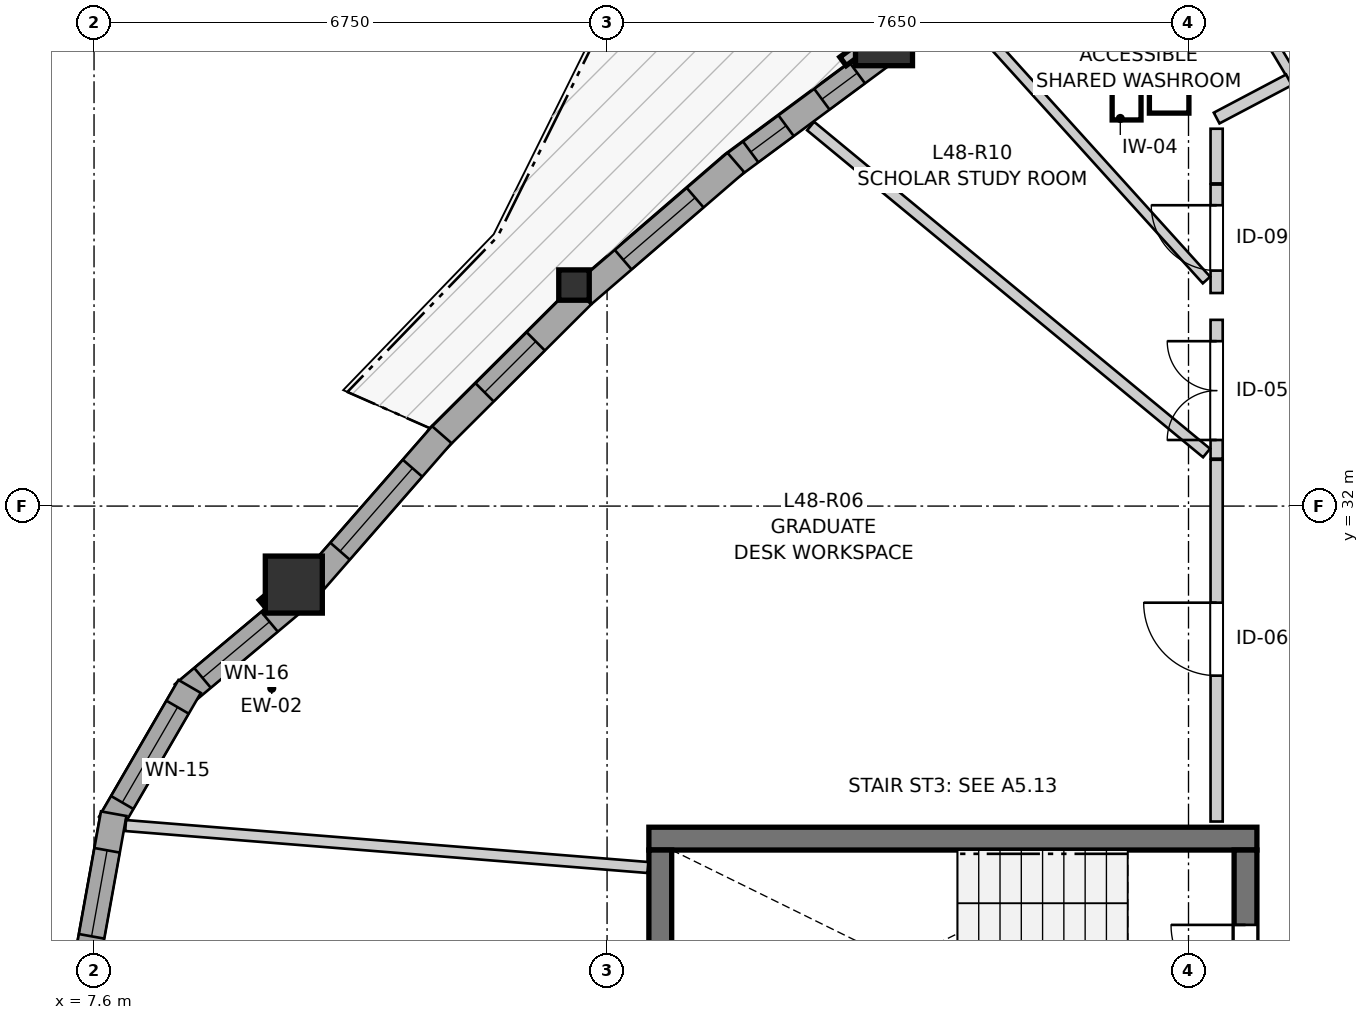
"""IFC4 building model, lengths in metres.
Left out: names, types, materials, properties, quantities, classifications, styles, units other than length and angle.
Written with IfcOpenShell. Run it as: python <this file> out.ifc"""

import sys

from ifc_helpers import new_model, si_unit, direction, frame, frame_2d, origin, origin_2d, place, context, subcontext, project, spatial, rectangle, i_section, extrude, source, transform, mapped, element, fill, save


model = new_model("IFC4")
c1 = context("Model", 3, precision=1e-05, world=origin(), true_north=direction((0.0, 1.0)))
c2 = subcontext(c1, "Body", "Model", "MODEL_VIEW")
j1 = project(units=[si_unit("LENGTHUNIT", "METRE"), si_unit("PLANEANGLEUNIT", "RADIAN")], contexts=[c1])
p1 = place(None, origin())
s1 = spatial("IfcSite", under=j1, at=p1, CompositionType="ELEMENT")
p2 = place(p1, origin())
s2 = spatial("IfcBuilding", under=s1, at=p2, CompositionType="ELEMENT")
p3 = place(p2, frame((0.0, 0.0, 161.8)))
s3 = spatial("IfcBuildingStorey", under=s2, at=p3, CompositionType="ELEMENT", Elevation=161.8)
p4 = place(p3, frame((22.9, 27.625, 0.0), z_axis=(0.0, 0.0, 1.0), x_axis=(-1.0, 0.0, 0.0)))
e1 = element("IfcWall", 1, at=p4, inside=s3, PredefinedType="SHEAR", context=c2, shape_type="SweptSolid", body=[
    extrude(rectangle(XDim=8.0, YDim=0.3, at=frame_2d((4.0, 0.0))), origin(), (0.0, 0.0, 1.0), 2.95),
])
p5 = place(p3, frame((15.05, 27.475, 0.0), z_axis=(0.0, 0.0, 1.0), x_axis=(0.0, -1.0, 0.0)))
e2 = element("IfcWall", 2, at=p5, inside=s3, PredefinedType="SHEAR", context=c2, shape_type="SweptSolid", body=[
    extrude(rectangle(XDim=2.95, YDim=0.3, at=frame_2d((1.475, 0.0))), origin(), (0.0, 0.0, 1.0), 2.95),
])
p6 = place(p3, frame((22.75, 24.525, 0.0), z_axis=(0.0, 0.0, 1.0), x_axis=(0.0, 1.0, 0.0)))
e3 = element("IfcWall", 3, at=p6, inside=s3, PredefinedType="SHEAR", context=c2, shape_type="SweptSolid", body=[
    extrude(rectangle(XDim=2.95, YDim=0.3, at=frame_2d((1.475, 0.0))), origin(), (0.0, 0.0, 1.0), 2.95),
])
p7 = place(p6, frame((0.985, 0.0, 0.0)))
e4 = element("IfcOpeningElement", 4, at=p7, cuts=e3, PredefinedType="OPENING", context=c2, shape_type="SweptSolid", body=[
    extrude(rectangle(XDim=0.98, YDim=2.15, at=frame_2d((0.49, 1.075))), frame((0.0, 0.16, 0.0), z_axis=(0.0, -1.0, 0.0), x_axis=(1.0, 0.0, 0.0)), (0.0, 0.0, 1.0), 0.32),
])
m1 = source(origin(), c2, "Body", "SweptSolid", [
    extrude(rectangle(XDim=0.75, YDim=0.75, at=origin_2d()), origin(), (0.0, 0.0, 1.0), 2.95),
])
for number, where, z_axis, x_axis in (
    (5, (10.229, 30.967, 0.0), (0.0, 0.0, 1.0), (1.0, 0.0, 0.0)),
    (6, (17.994, 38.169, 0.0), (0.0, 0.0, 1.0), (1.0, 0.0, 0.0)),
):
    element("IfcColumn", number, at=place(p3, frame(where, z_axis=z_axis, x_axis=x_axis)), inside=s3, PredefinedType="COLUMN", context=c2, shape_type="MappedRepresentation", body=[
        mapped(m1, transform((0.0, 0.0, 0.0), x_axis=(1.0, 0.0, 0.0), y_axis=(0.0, 1.0, 0.0), z_axis=(0.0, 0.0, 1.0), scale=1.0)),
    ])
m2 = source(origin(), c2, "Body", "SweptSolid", [
    extrude(i_section(OverallWidth=0.401, OverallDepth=0.399, WebThickness=0.023, FlangeThickness=0.036, FilletRadius=0.015, at=origin_2d()), origin(), (0.0, 0.0, 1.0), 2.95),
])
p8 = place(p3, frame((13.915, 34.908, 0.0), z_axis=(0.0, 0.0, 1.0), x_axis=(1.0, 0.0, 0.0)))
e7 = element("IfcColumn", 7, at=p8, inside=s3, PredefinedType="PILASTER", context=c2, shape_type="MappedRepresentation", body=[
    mapped(m2, transform((0.0, 0.0, 0.0), x_axis=(1.0, 0.0, 0.0), y_axis=(0.0, 1.0, 0.0), z_axis=(0.0, 0.0, 1.0), scale=1.0)),
])
p9 = place(p3, frame((10.219, 30.737, 0.0), z_axis=(0.0, 0.0, 1.0), x_axis=(-0.76661852922, -0.642102819381, 0.0)))
e8 = element("IfcWall", 8, at=p9, inside=s3, PredefinedType="SOLIDWALL", context=c2, shape_type="SweptSolid", body=[
    extrude(rectangle(XDim=1.888, YDim=0.34, at=frame_2d((0.944, 0.0))), origin(), (0.0, 0.0, 1.0), 2.53),
])
p10 = place(p9, frame((0.404, 0.0, 0.82)))
e9 = element("IfcOpeningElement", 9, at=p10, cuts=e8, PredefinedType="OPENING", context=c2, shape_type="SweptSolid", body=[
    extrude(rectangle(XDim=1.15, YDim=1.2, at=frame_2d((0.575, 0.6))), frame((0.0, 0.18, 0.0), z_axis=(0.0, -1.0, 0.0), x_axis=(1.0, 0.0, 0.0)), (0.0, 0.0, 1.0), 0.36),
])
p11 = place(p3, frame((8.858, 29.627, 0.0), z_axis=(0.0, 0.0, 1.0), x_axis=(-0.502177965272, -0.864764298058, 0.0)))
e10 = element("IfcWall", 10, at=p11, inside=s3, PredefinedType="SOLIDWALL", context=c2, shape_type="SweptSolid", body=[
    extrude(rectangle(XDim=2.081, YDim=0.34, at=frame_2d((1.041, 0.0))), origin(), (0.0, 0.0, 1.0), 2.53),
])
p12 = place(p11, frame((0.315, 0.0, 0.82)))
e11 = element("IfcOpeningElement", 11, at=p12, cuts=e10, PredefinedType="OPENING", context=c2, shape_type="SweptSolid", body=[
    extrude(rectangle(XDim=1.45, YDim=1.25, at=frame_2d((0.725, 0.625))), frame((0.0, 0.18, 0.0), z_axis=(0.0, -1.0, 0.0), x_axis=(1.0, 0.0, 0.0)), (0.0, 0.0, 1.0), 0.36),
])
p13 = place(p3, frame((7.859, 27.953, 0.0), z_axis=(0.0, 0.0, 1.0), x_axis=(-0.177605215389, -0.984101817632, 0.0)))
e12 = element("IfcWall", 12, at=p13, inside=s3, PredefinedType="SOLIDWALL", context=c2, shape_type="SweptSolid", body=[
    extrude(rectangle(XDim=2.081, YDim=0.34, at=frame_2d((1.041, 0.0))), origin(), (0.0, 0.0, 1.0), 2.53),
])
p14 = place(p13, frame((0.489, 0.0, 0.82)))
e13 = element("IfcOpeningElement", 13, at=p14, cuts=e12, PredefinedType="OPENING", context=c2, shape_type="SweptSolid", body=[
    extrude(rectangle(XDim=1.15, YDim=1.2, at=frame_2d((0.575, 0.6))), frame((0.0, 0.18, 0.0), z_axis=(0.0, -1.0, 0.0), x_axis=(1.0, 0.0, 0.0)), (0.0, 0.0, 1.0), 0.36),
])
p15 = place(p3, frame((20.303, 39.421, 0.0), z_axis=(0.0, 0.0, 1.0), x_axis=(-0.846381586821, -0.532576951707, 0.0)))
e14 = element("IfcWall", 14, at=p15, inside=s3, PredefinedType="SOLIDWALL", context=c2, shape_type="SweptSolid", body=[
    extrude(rectangle(XDim=2.466, YDim=0.34, at=frame_2d((1.233, 0.0))), origin(), (0.0, 0.0, 1.0), 2.53),
])
p16 = place(p15, frame((0.287, 0.0, 0.82)))
e15 = element("IfcOpeningElement", 15, at=p16, cuts=e14, PredefinedType="OPENING", context=c2, shape_type="SweptSolid", body=[
    extrude(rectangle(XDim=1.05, YDim=1.45, at=frame_2d((0.525, 0.725))), frame((0.0, 0.18, 0.0), z_axis=(0.0, -1.0, 0.0), x_axis=(1.0, 0.0, 0.0)), (0.0, 0.0, 1.0), 0.36),
])
p17 = place(p3, frame((17.97, 37.94, 0.0), z_axis=(0.0, 0.0, 1.0), x_axis=(-0.803844722302, -0.594839190393, 0.0)))
e16 = element("IfcWall", 16, at=p17, inside=s3, PredefinedType="SOLIDWALL", context=c2, shape_type="SweptSolid", body=[
    extrude(rectangle(XDim=2.481, YDim=0.34, at=frame_2d((1.24, 0.0))), origin(), (0.0, 0.0, 1.0), 2.53),
])
p18 = place(p17, frame((0.407, 0.0, 0.82)))
e17 = element("IfcOpeningElement", 17, at=p18, cuts=e16, PredefinedType="OPENING", context=c2, shape_type="SweptSolid", body=[
    extrude(rectangle(XDim=0.58, YDim=1.35, at=frame_2d((0.29, 0.675))), frame((0.0, 0.18, 0.0), z_axis=(0.0, -1.0, 0.0), x_axis=(1.0, 0.0, 0.0)), (0.0, 0.0, 1.0), 0.36),
])
p19 = place(p17, frame((1.573, 0.0, 0.82)))
e18 = element("IfcOpeningElement", 18, at=p19, cuts=e16, PredefinedType="OPENING", context=c2, shape_type="SweptSolid", body=[
    extrude(rectangle(XDim=0.58, YDim=1.35, at=frame_2d((0.29, 0.675))), frame((0.0, 0.18, 0.0), z_axis=(0.0, -1.0, 0.0), x_axis=(1.0, 0.0, 0.0)), (0.0, 0.0, 1.0), 0.36),
])
p20 = place(p3, frame((16.045, 36.519, 0.0), z_axis=(0.0, 0.0, 1.0), x_axis=(-0.757449302754, -0.652893983551, 0.0)))
e19 = element("IfcWall", 19, at=p20, inside=s3, PredefinedType="SOLIDWALL", context=c2, shape_type="SweptSolid", body=[
    extrude(rectangle(XDim=2.646, YDim=0.34, at=frame_2d((1.323, 0.0))), origin(), (0.0, 0.0, 1.0), 2.53),
])
p21 = place(p20, frame((0.708, 0.0, 0.82)))
e20 = element("IfcOpeningElement", 20, at=p21, cuts=e19, PredefinedType="OPENING", context=c2, shape_type="SweptSolid", body=[
    extrude(rectangle(XDim=1.25, YDim=1.35, at=frame_2d((0.625, 0.675))), frame((0.0, 0.18, 0.0), z_axis=(0.0, -1.0, 0.0), x_axis=(1.0, 0.0, 0.0)), (0.0, 0.0, 1.0), 0.36),
])
p22 = place(p3, frame((14.021, 34.773, 0.0), z_axis=(0.0, 0.0, 1.0), x_axis=(-0.708421987765, -0.705789123784, 0.0)))
e21 = element("IfcWall", 21, at=p22, inside=s3, PredefinedType="SOLIDWALL", context=c2, shape_type="SweptSolid", body=[
    extrude(rectangle(XDim=2.689, YDim=0.34, at=frame_2d((1.345, 0.0))), origin(), (0.0, 0.0, 1.0), 2.53),
])
p23 = place(p22, frame((0.86, 0.0, 0.82)))
e22 = element("IfcOpeningElement", 22, at=p23, cuts=e21, PredefinedType="OPENING", context=c2, shape_type="SweptSolid", body=[
    extrude(rectangle(XDim=0.95, YDim=1.35, at=frame_2d((0.475, 0.675))), frame((0.0, 0.18, 0.0), z_axis=(0.0, -1.0, 0.0), x_axis=(1.0, 0.0, 0.0)), (0.0, 0.0, 1.0), 0.36),
])
p24 = place(p3, frame((12.176, 32.939, 0.0), z_axis=(0.0, 0.0, 1.0), x_axis=(-0.65766354423, -0.753311796397, 0.0)))
e23 = element("IfcWall", 23, at=p24, inside=s3, PredefinedType="SOLIDWALL", context=c2, shape_type="SweptSolid", body=[
    extrude(rectangle(XDim=2.611, YDim=0.34, at=frame_2d((1.306, 0.0))), origin(), (0.0, 0.0, 1.0), 2.53),
])
p25 = place(p24, frame((0.586, 0.0, 0.82)))
e24 = element("IfcOpeningElement", 24, at=p25, cuts=e23, PredefinedType="OPENING", context=c2, shape_type="SweptSolid", body=[
    extrude(rectangle(XDim=1.45, YDim=1.25, at=frame_2d((0.725, 0.625))), frame((0.0, 0.18, 0.0), z_axis=(0.0, -1.0, 0.0), x_axis=(1.0, 0.0, 0.0)), (0.0, 0.0, 1.0), 0.36),
])
p26 = place(p3, frame((22.37, 27.85, 0.0), z_axis=(0.0, 0.0, 1.0), x_axis=(0.0, 1.0, 0.0)))
e25 = element("IfcWall", 25, at=p26, inside=s3, PredefinedType="PARTITIONING", context=c2, shape_type="SweptSolid", body=[
    extrude(rectangle(XDim=4.759, YDim=0.16, at=frame_2d((2.379, 0.0))), origin(), (0.0, 0.0, 1.0), 2.95),
])
p27 = place(p26, frame((1.919, 0.0, 0.0)))
e26 = element("IfcOpeningElement", 26, at=p27, cuts=e25, PredefinedType="OPENING", context=c2, shape_type="SweptSolid", body=[
    extrude(rectangle(XDim=0.96, YDim=2.1, at=frame_2d((0.48, 1.05))), frame((0.0, 0.09, 0.0), z_axis=(0.0, -1.0, 0.0), x_axis=(1.0, 0.0, 0.0)), (0.0, 0.0, 1.0), 0.18),
])
p28 = place(p3, frame((22.37, 32.624, 0.0), z_axis=(0.0, 0.0, 1.0), x_axis=(0.0, 1.0, 0.0)))
e27 = element("IfcWall", 27, at=p28, inside=s3, PredefinedType="PARTITIONING", context=c2, shape_type="SweptSolid", body=[
    extrude(rectangle(XDim=1.826, YDim=0.16, at=frame_2d((0.913, 0.0))), origin(), (0.0, 0.0, 1.0), 2.95),
])
p29 = place(p28, frame((0.246, 0.0, 0.0)))
e28 = element("IfcOpeningElement", 28, at=p29, cuts=e27, PredefinedType="OPENING", context=c2, shape_type="SweptSolid", body=[
    extrude(rectangle(XDim=1.3, YDim=2.1, at=frame_2d((0.65, 1.05))), frame((0.0, 0.09, 0.0), z_axis=(0.0, -1.0, 0.0), x_axis=(1.0, 0.0, 0.0)), (0.0, 0.0, 1.0), 0.18),
])
p30 = place(p3, frame((22.37, 34.803, 0.0), z_axis=(0.0, 0.0, 1.0), x_axis=(0.0, 1.0, 0.0)))
e29 = element("IfcWall", 29, at=p30, inside=s3, PredefinedType="PARTITIONING", context=c2, shape_type="SweptSolid", body=[
    extrude(rectangle(XDim=1.427, YDim=0.16, at=frame_2d((0.713, 0.0))), origin(), (0.0, 0.0, 1.0), 2.95),
])
p31 = place(p30, frame((0.295, 0.0, 0.0)))
e30 = element("IfcOpeningElement", 30, at=p31, cuts=e29, PredefinedType="OPENING", context=c2, shape_type="SweptSolid", body=[
    extrude(rectangle(XDim=0.86, YDim=2.05, at=frame_2d((0.43, 1.025))), frame((0.0, 0.09, 0.0), z_axis=(0.0, -1.0, 0.0), x_axis=(1.0, 0.0, 0.0)), (0.0, 0.0, 1.0), 0.18),
])
p32 = place(p3, frame((17.028, 37.0, 0.0), z_axis=(0.0, 0.0, 1.0), x_axis=(0.771119105053, -0.636690918596, 0.0)))
e31 = element("IfcWall", 31, at=p32, inside=s3, PredefinedType="PARTITIONING", context=c2, shape_type="SweptSolid", body=[
    extrude(rectangle(XDim=6.756, YDim=0.145, at=frame_2d((3.378, 0.0))), origin(), (0.0, 0.0, 1.0), 2.95),
])
p33 = place(p3, frame((8.015, 27.797, 0.0), z_axis=(0.0, 0.0, 1.0), x_axis=(0.996785477909, -0.080116858581, 0.0)))
e32 = element("IfcWall", 32, at=p33, inside=s3, PredefinedType="PARTITIONING", context=c2, shape_type="SweptSolid", body=[
    extrude(rectangle(XDim=6.893, YDim=0.145, at=frame_2d((3.447, 0.0))), origin(), (0.0, 0.0, 1.0), 2.95),
])
p34 = place(p3, frame((19.101, 38.441, 0.0), z_axis=(0.0, 0.0, 1.0), x_axis=(0.670702711046, -0.741726279295, 0.0)))
e33 = element("IfcWall", 33, at=p34, inside=s3, PredefinedType="PARTITIONING", context=c2, shape_type="SweptSolid", body=[
    extrude(rectangle(XDim=4.675, YDim=0.13, at=frame_2d((2.337, 0.0))), origin(), (0.0, 0.0, 1.0), 2.95),
])
p35 = place(p3, frame((21.92, 40.065, 0.0), z_axis=(0.0, 0.0, 1.0), x_axis=(0.514051974364, -0.857759038223, 0.0)))
e34 = element("IfcWall", 34, at=p35, inside=s3, PredefinedType="PARTITIONING", context=c2, shape_type="SweptSolid", body=[
    extrude(rectangle(XDim=2.832, YDim=0.13, at=frame_2d((1.416, 0.0))), origin(), (0.0, 0.0, 1.0), 2.95),
])
p36 = place(p3, frame((22.37, 37.105, 0.0), z_axis=(0.0, 0.0, 1.0), x_axis=(0.884455008011, 0.466625480234, 0.0)))
e35 = element("IfcWall", 35, at=p36, inside=s3, PredefinedType="PARTITIONING", context=c2, shape_type="SweptSolid", body=[
    extrude(rectangle(XDim=1.076, YDim=0.16, at=frame_2d((0.538, 0.0))), origin(), (0.0, 0.0, 1.0), 2.558),
])
p37 = place(p3, frame((22.37, 36.245, 0.0), z_axis=(0.0, 0.0, 1.0), x_axis=(0.0, 1.0, 0.0)))
e36 = element("IfcWall", 36, at=p37, inside=s3, PredefinedType="PARTITIONING", context=c2, shape_type="SweptSolid", body=[
    extrude(rectangle(XDim=0.719, YDim=0.16, at=frame_2d((0.36, 0.0))), origin(), (0.0, 0.0, 1.0), 2.95),
])
m3 = source(origin(), c2, "Body", "SweptSolid", [
    extrude(rectangle(XDim=1.15, YDim=1.2, at=frame_2d((0.575, 0.6))), frame((0.0, 0.03, 0.0), z_axis=(0.0, -1.0, 0.0), x_axis=(1.0, 0.0, 0.0)), (0.0, 0.0, 1.0), 0.06),
])
p38 = place(p10, origin())
e37 = element("IfcWindow", 37, at=p38, inside=s3, PartitioningType="SINGLE_PANEL", PredefinedType="WINDOW", context=c2, shape_type="MappedRepresentation", body=[
    mapped(m3, transform((0.0, 0.0, 0.0), x_axis=(1.0, 0.0, 0.0), y_axis=(0.0, 1.0, 0.0), z_axis=(0.0, 0.0, 1.0), scale=1.0)),
])
fill(e9, e37)
m4 = source(origin(), c2, "Body", "SweptSolid", [
    extrude(rectangle(XDim=1.45, YDim=1.25, at=frame_2d((0.725, 0.625))), frame((0.0, 0.03, 0.0), z_axis=(0.0, -1.0, 0.0), x_axis=(1.0, 0.0, 0.0)), (0.0, 0.0, 1.0), 0.06),
])
p39 = place(p12, origin())
e38 = element("IfcWindow", 38, at=p39, inside=s3, PartitioningType="SINGLE_PANEL", PredefinedType="WINDOW", context=c2, shape_type="MappedRepresentation", body=[
    mapped(m4, transform((0.0, 0.0, 0.0), x_axis=(1.0, 0.0, 0.0), y_axis=(0.0, 1.0, 0.0), z_axis=(0.0, 0.0, 1.0), scale=1.0)),
])
fill(e11, e38)
p40 = place(p14, origin())
e39 = element("IfcWindow", 39, at=p40, inside=s3, PartitioningType="SINGLE_PANEL", PredefinedType="WINDOW", context=c2, shape_type="MappedRepresentation", body=[
    mapped(m3, transform((0.0, 0.0, 0.0), x_axis=(1.0, 0.0, 0.0), y_axis=(0.0, 1.0, 0.0), z_axis=(0.0, 0.0, 1.0), scale=1.0)),
])
fill(e13, e39)
m5 = source(origin(), c2, "Body", "SweptSolid", [
    extrude(rectangle(XDim=0.58, YDim=1.35, at=frame_2d((0.29, 0.675))), frame((0.0, 0.03, 0.0), z_axis=(0.0, -1.0, 0.0), x_axis=(1.0, 0.0, 0.0)), (0.0, 0.0, 1.0), 0.06),
])
p41 = place(p18, origin())
e40 = element("IfcWindow", 40, at=p41, inside=s3, PartitioningType="SINGLE_PANEL", PredefinedType="WINDOW", context=c2, shape_type="MappedRepresentation", body=[
    mapped(m5, transform((0.0, 0.0, 0.0), x_axis=(1.0, 0.0, 0.0), y_axis=(0.0, 1.0, 0.0), z_axis=(0.0, 0.0, 1.0), scale=1.0)),
])
fill(e17, e40)
p42 = place(p19, origin())
e41 = element("IfcWindow", 41, at=p42, inside=s3, PartitioningType="SINGLE_PANEL", PredefinedType="WINDOW", context=c2, shape_type="MappedRepresentation", body=[
    mapped(m5, transform((0.0, 0.0, 0.0), x_axis=(1.0, 0.0, 0.0), y_axis=(0.0, 1.0, 0.0), z_axis=(0.0, 0.0, 1.0), scale=1.0)),
])
fill(e18, e41)
m6 = source(origin(), c2, "Body", "SweptSolid", [
    extrude(rectangle(XDim=1.25, YDim=1.35, at=frame_2d((0.625, 0.675))), frame((0.0, 0.03, 0.0), z_axis=(0.0, -1.0, 0.0), x_axis=(1.0, 0.0, 0.0)), (0.0, 0.0, 1.0), 0.06),
])
p43 = place(p21, origin())
e42 = element("IfcWindow", 42, at=p43, inside=s3, PartitioningType="SINGLE_PANEL", PredefinedType="WINDOW", context=c2, shape_type="MappedRepresentation", body=[
    mapped(m6, transform((0.0, 0.0, 0.0), x_axis=(1.0, 0.0, 0.0), y_axis=(0.0, 1.0, 0.0), z_axis=(0.0, 0.0, 1.0), scale=1.0)),
])
fill(e20, e42)
m7 = source(origin(), c2, "Body", "SweptSolid", [
    extrude(rectangle(XDim=0.95, YDim=1.35, at=frame_2d((0.475, 0.675))), frame((0.0, 0.03, 0.0), z_axis=(0.0, -1.0, 0.0), x_axis=(1.0, 0.0, 0.0)), (0.0, 0.0, 1.0), 0.06),
])
p44 = place(p23, origin())
e43 = element("IfcWindow", 43, at=p44, inside=s3, PartitioningType="SINGLE_PANEL", PredefinedType="WINDOW", context=c2, shape_type="MappedRepresentation", body=[
    mapped(m7, transform((0.0, 0.0, 0.0), x_axis=(1.0, 0.0, 0.0), y_axis=(0.0, 1.0, 0.0), z_axis=(0.0, 0.0, 1.0), scale=1.0)),
])
fill(e22, e43)
p45 = place(p25, origin())
e44 = element("IfcWindow", 44, at=p45, inside=s3, PartitioningType="SINGLE_PANEL", PredefinedType="WINDOW", context=c2, shape_type="MappedRepresentation", body=[
    mapped(m4, transform((0.0, 0.0, 0.0), x_axis=(1.0, 0.0, 0.0), y_axis=(0.0, 1.0, 0.0), z_axis=(0.0, 0.0, 1.0), scale=1.0)),
])
fill(e24, e44)
m8 = source(origin(), c2, "Body", "SweptSolid", [
    extrude(rectangle(XDim=0.98, YDim=2.15, at=frame_2d((0.49, 1.075))), frame((0.0, 0.025, 0.0), z_axis=(0.0, -1.0, 0.0), x_axis=(1.0, 0.0, 0.0)), (0.0, 0.0, 1.0), 0.05),
])
p46 = place(p7, origin())
e45 = element("IfcDoor", 45, at=p46, inside=s3, OperationType="SINGLE_SWING_RIGHT", PredefinedType="DOOR", context=c2, shape_type="MappedRepresentation", body=[
    mapped(m8, transform((0.0, 0.0, 0.0), x_axis=(1.0, 0.0, 0.0), y_axis=(0.0, 1.0, 0.0), z_axis=(0.0, 0.0, 1.0), scale=1.0)),
])
fill(e4, e45)
m9 = source(origin(), c2, "Body", "SweptSolid", [
    extrude(rectangle(XDim=0.96, YDim=2.1, at=frame_2d((0.48, 1.05))), frame((0.0, 0.025, 0.0), z_axis=(0.0, -1.0, 0.0), x_axis=(1.0, 0.0, 0.0)), (0.0, 0.0, 1.0), 0.05),
])
p47 = place(p27, origin())
e46 = element("IfcDoor", 46, at=p47, inside=s3, OperationType="SINGLE_SWING_RIGHT", PredefinedType="DOOR", context=c2, shape_type="MappedRepresentation", body=[
    mapped(m9, transform((0.0, 0.0, 0.0), x_axis=(1.0, 0.0, 0.0), y_axis=(0.0, 1.0, 0.0), z_axis=(0.0, 0.0, 1.0), scale=1.0)),
])
fill(e26, e46)
m10 = source(origin(), c2, "Body", "SweptSolid", [
    extrude(rectangle(XDim=1.3, YDim=2.1, at=frame_2d((0.65, 1.05))), frame((0.0, 0.025, 0.0), z_axis=(0.0, -1.0, 0.0), x_axis=(1.0, 0.0, 0.0)), (0.0, 0.0, 1.0), 0.05),
])
p48 = place(p29, origin())
e47 = element("IfcDoor", 47, at=p48, inside=s3, OperationType="DOUBLE_DOOR_SINGLE_SWING", PredefinedType="DOOR", context=c2, shape_type="MappedRepresentation", body=[
    mapped(m10, transform((0.0, 0.0, 0.0), x_axis=(1.0, 0.0, 0.0), y_axis=(0.0, 1.0, 0.0), z_axis=(0.0, 0.0, 1.0), scale=1.0)),
])
fill(e28, e47)
m11 = source(origin(), c2, "Body", "SweptSolid", [
    extrude(rectangle(XDim=0.86, YDim=2.05, at=frame_2d((0.43, 1.025))), frame((0.0, 0.025, 0.0), z_axis=(0.0, -1.0, 0.0), x_axis=(1.0, 0.0, 0.0)), (0.0, 0.0, 1.0), 0.05),
])
p49 = place(p31, origin())
e48 = element("IfcDoor", 48, at=p49, inside=s3, OperationType="SINGLE_SWING_RIGHT", PredefinedType="DOOR", context=c2, shape_type="MappedRepresentation", body=[
    mapped(m11, transform((0.0, 0.0, 0.0), x_axis=(1.0, 0.0, 0.0), y_axis=(0.0, 1.0, 0.0), z_axis=(0.0, 0.0, 1.0), scale=1.0)),
])
fill(e30, e48)
save(model, sys.argv[1])
